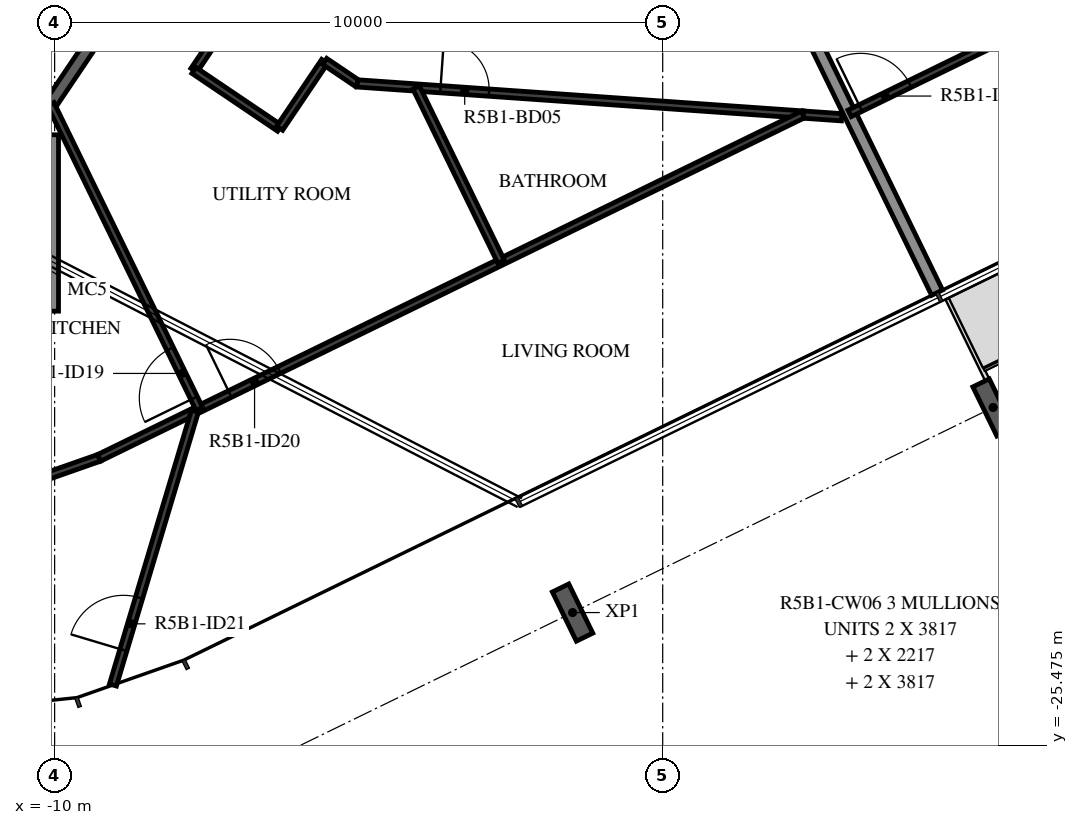
"""IFC4 building model, lengths in metres.
Left out: names, types, materials, properties, quantities, classifications, styles, units other than length and angle.
Written with IfcOpenShell. Run it as: python <this file> out.ifc"""

import sys

from ifc_helpers import new_model, si_unit, direction, frame, frame_2d, origin, origin_2d, place, context, subcontext, project, spatial, polyline, rectangle, i_section, outline, extrude, element, fill, save


model = new_model("IFC4")
c1 = context("Model", 3, precision=1e-05, world=origin(), true_north=direction((0.0, 1.0)))
c2 = subcontext(c1, "Body", "Model", "MODEL_VIEW")
j1 = project(units=[si_unit("LENGTHUNIT", "METRE"), si_unit("PLANEANGLEUNIT", "RADIAN")], contexts=[c1])
p1 = place(None, origin())
s1 = spatial("IfcSite", under=j1, at=p1, CompositionType="ELEMENT")
p2 = place(p1, origin())
s2 = spatial("IfcBuilding", under=s1, at=p2, CompositionType="ELEMENT")
p3 = place(p2, frame((0.0, 0.0, 198.9)))
s3 = spatial("IfcBuildingStorey", under=s2, at=p3, CompositionType="ELEMENT", Elevation=198.9)
for number, where, z_axis, x_axis in (
    (1, (-1.482, -23.287, -0.38), (0.0, 0.0, 1.0), (-0.899, -0.438, 0.0)),
    (2, (5.433, -19.915, -0.38), (0.0, 0.0, 1.0), (-0.899, -0.438, 0.0)),
):
    element("IfcColumn", number, at=place(p3, frame(where, z_axis=z_axis, x_axis=x_axis)), inside=s3, PredefinedType="COLUMN", context=c2, shape_type="SweptSolid", body=[
        extrude(i_section(OverallWidth=0.3, OverallDepth=0.9, WebThickness=0.019, FlangeThickness=0.035, FilletRadius=0.03, at=origin_2d()), origin(), (0.0, 0.0, 1.0), 3.5),
    ])
p4 = place(p3, frame((-10.066, -14.924, 0.0), z_axis=(0.0, 0.0, 1.0), x_axis=(0.559173899945, 0.829050390278, 0.0)))
e3 = element("IfcWall", 3, at=p4, inside=s3, PredefinedType="STANDARD", context=c2, shape_type="SweptSolid", body=[
    extrude(rectangle(XDim=4.601, YDim=0.2, at=frame_2d((2.301, 0.0))), origin(), (0.0, 0.0, 1.0), 3.12),
])
p5 = place(p3, frame((-10.408, -15.43, 0.0), z_axis=(0.0, 0.0, 1.0), x_axis=(0.559390561924, 0.828904215956, 0.0)))
e4 = element("IfcWall", 4, at=p5, inside=s3, PredefinedType="STANDARD", context=c2, shape_type="SweptSolid", body=[
    extrude(rectangle(XDim=0.612, YDim=0.2, at=frame_2d((0.306, 0.0))), origin(), (0.0, 0.0, 1.0), 3.12),
])
p6 = place(p3, frame((4.512, -18.027, 0.0), z_axis=(0.0, 0.0, 1.0), x_axis=(-0.438374835386, 0.898792247241, 0.0)))
e5 = element("IfcWall", 5, at=p6, inside=s3, PredefinedType="STANDARD", context=c2, shape_type="SweptSolid", body=[
    extrude(rectangle(XDim=4.929, YDim=0.2, at=frame_2d((2.464, 0.0))), origin(), (0.0, 0.0, 1.0), 2.73),
])
p7 = place(p3, frame((-6.968, -13.273, 0.0), z_axis=(0.0, 0.0, 1.0), x_axis=(-0.559283007371, -0.828976789582, 0.0)))
e6 = element("IfcWall", 6, at=p7, inside=s3, PredefinedType="PARTITIONING", context=c2, shape_type="SweptSolid", body=[
    extrude(rectangle(XDim=1.325, YDim=0.12, at=frame_2d((0.663, 0.0))), origin(), (0.0, 0.0, 1.0), 3.12),
])
p8 = place(p3, frame((-7.709, -14.371, 0.0), z_axis=(0.0, 0.0, 1.0), x_axis=(0.829033422808, -0.559199055675, 0.0)))
e7 = element("IfcWall", 7, at=p8, inside=s3, PredefinedType="PARTITIONING", context=c2, shape_type="SweptSolid", body=[
    extrude(rectangle(XDim=1.7, YDim=0.12, at=frame_2d((0.85, 0.0))), origin(), (0.0, 0.0, 1.0), 3.12),
])
p9 = place(p3, frame((-6.3, -15.322, 0.0), z_axis=(0.0, 0.0, 1.0), x_axis=(0.559197608403, 0.829034399019, 0.0)))
e8 = element("IfcWall", 8, at=p9, inside=s3, PredefinedType="PARTITIONING", context=c2, shape_type="SweptSolid", body=[
    extrude(rectangle(XDim=1.325, YDim=0.12, at=frame_2d((0.663, 0.0))), origin(), (0.0, 0.0, 1.0), 3.12),
])
p10 = place(p3, frame((-5.559, -14.223, 0.0), z_axis=(0.0, 0.0, 1.0), x_axis=(0.828844300469, -0.559479334363, 0.0)))
e9 = element("IfcWall", 9, at=p10, inside=s3, PredefinedType="PARTITIONING", context=c2, shape_type="SweptSolid", body=[
    extrude(rectangle(XDim=0.647, YDim=0.12, at=frame_2d((0.324, 0.0))), origin(), (0.0, 0.0, 1.0), 3.12),
])
p11 = place(p3, frame((-5.022, -14.585, 0.0), z_axis=(0.0, 0.0, 1.0), x_axis=(0.997564196041, -0.06975438895, 0.0)))
e10 = element("IfcWall", 10, at=p11, inside=s3, PredefinedType="PARTITIONING", context=c2, shape_type="SweptSolid", body=[
    extrude(rectangle(XDim=7.346, YDim=0.12, at=frame_2d((3.673, 0.0))), origin(), (0.0, 0.0, 1.0), 3.12),
])
p12 = place(p11, frame((1.37, 0.0, 0.0)))
e11 = element("IfcOpeningElement", 11, at=p12, cuts=e10, PredefinedType="OPENING", context=c2, shape_type="SweptSolid", body=[
    extrude(rectangle(XDim=0.8, YDim=2.1, at=frame_2d((0.4, 1.05))), frame((0.0, 0.07, 0.0), z_axis=(0.0, -1.0, 0.0), x_axis=(1.0, 0.0, 0.0)), (0.0, 0.0, 1.0), 0.14),
])
p13 = place(p3, frame((2.306, -15.098, 0.0), z_axis=(0.0, 0.0, 1.0), x_axis=(0.99757571817, -0.069589413839, 0.0)))
e12 = element("IfcWall", 12, at=p13, inside=s3, PredefinedType="PARTITIONING", context=c2, shape_type="SweptSolid", body=[
    extrude(rectangle(XDim=0.638, YDim=0.12, at=frame_2d((0.319, 0.0))), origin(), (0.0, 0.0, 1.0), 3.12),
])
p14 = place(p3, frame((-10.427, -21.149, 0.0), z_axis=(0.0, 0.0, 1.0), x_axis=(0.943591256744, 0.331112579338, 0.0)))
e13 = element("IfcWall", 13, at=p14, inside=s3, PredefinedType="PARTITIONING", context=c2, shape_type="SweptSolid", body=[
    extrude(rectangle(XDim=1.227, YDim=0.12, at=frame_2d((0.613, 0.0))), origin(), (0.0, 0.0, 1.0), 3.12),
])
p15 = place(p3, frame((-9.269, -20.743, 0.0), z_axis=(0.0, 0.0, 1.0), x_axis=(0.898796865831, 0.438365365846, 0.0)))
e14 = element("IfcWall", 14, at=p15, inside=s3, PredefinedType="PARTITIONING", context=c2, shape_type="SweptSolid", body=[
    extrude(rectangle(XDim=12.879, YDim=0.12, at=frame_2d((6.439, 0.0))), origin(), (0.0, 0.0, 1.0), 3.12),
])
p16 = place(p15, frame((2.395, 0.0, 0.0)))
e15 = element("IfcOpeningElement", 15, at=p16, cuts=e14, PredefinedType="OPENING", context=c2, shape_type="SweptSolid", body=[
    extrude(rectangle(XDim=0.9, YDim=2.1, at=frame_2d((0.45, 1.05))), frame((0.0, 0.07, 0.0), z_axis=(0.0, -1.0, 0.0), x_axis=(1.0, 0.0, 0.0)), (0.0, 0.0, 1.0), 0.14),
])
p17 = place(p3, frame((-7.62, -19.939, 0.0), z_axis=(0.0, 0.0, 1.0), x_axis=(-0.438353807908, 0.89880250283, 0.0)))
e16 = element("IfcWall", 16, at=p17, inside=s3, PredefinedType="PARTITIONING", context=c2, shape_type="SweptSolid", body=[
    extrude(rectangle(XDim=5.58, YDim=0.12, at=frame_2d((2.79, 0.0))), origin(), (0.0, 0.0, 1.0), 3.12),
])
p18 = place(p17, frame((0.2, 0.0, 0.0)))
e17 = element("IfcOpeningElement", 17, at=p18, cuts=e16, PredefinedType="OPENING", context=c2, shape_type="SweptSolid", body=[
    extrude(rectangle(XDim=0.9, YDim=2.1, at=frame_2d((0.45, 1.05))), frame((0.0, 0.07, 0.0), z_axis=(0.0, -1.0, 0.0), x_axis=(1.0, 0.0, 0.0)), (0.0, 0.0, 1.0), 0.14),
])
p19 = place(p3, frame((-9.041, -24.479, 0.0), z_axis=(0.0, 0.0, 1.0), x_axis=(0.286804727102, 0.957989064923, 0.0)))
e18 = element("IfcWall", 18, at=p19, inside=s3, PredefinedType="PARTITIONING", context=c2, shape_type="SweptSolid", body=[
    extrude(rectangle(XDim=4.701, YDim=0.12, at=frame_2d((2.351, 0.0))), origin(), (0.0, 0.0, 1.0), 3.12),
])
p20 = place(p19, frame((0.6, 0.0, 0.0)))
e19 = element("IfcOpeningElement", 19, at=p20, cuts=e18, PredefinedType="OPENING", context=c2, shape_type="SweptSolid", body=[
    extrude(rectangle(XDim=0.9, YDim=2.1, at=frame_2d((0.45, 1.05))), frame((0.0, 0.07, 0.0), z_axis=(0.0, -1.0, 0.0), x_axis=(1.0, 0.0, 0.0)), (0.0, 0.0, 1.0), 0.14),
])
p21 = place(p3, frame((-2.657, -17.518, 0.0), z_axis=(0.0, 0.0, 1.0), x_axis=(-0.438339139088, 0.898809656792, 0.0)))
e20 = element("IfcWall", 20, at=p21, inside=s3, PredefinedType="PARTITIONING", context=c2, shape_type="SweptSolid", body=[
    extrude(rectangle(XDim=3.188, YDim=0.12, at=frame_2d((1.594, 0.0))), origin(), (0.0, 0.0, 1.0), 3.12),
])
p22 = place(p3, frame((3.074, -15.078, 0.0), z_axis=(0.0, 0.0, 1.0), x_axis=(0.898793586225, 0.43837209008, 0.0)))
e21 = element("IfcWall", 21, at=p22, inside=s3, PredefinedType="PARTITIONING", context=c2, shape_type="SweptSolid", body=[
    extrude(rectangle(XDim=7.839, YDim=0.12, at=frame_2d((3.92, 0.0))), origin(), (0.0, 0.0, 1.0), 3.12),
])
p23 = place(p22, frame((0.2, 0.0, 0.0)))
e22 = element("IfcOpeningElement", 22, at=p23, cuts=e21, PredefinedType="OPENING", context=c2, shape_type="SweptSolid", body=[
    extrude(rectangle(XDim=0.9, YDim=2.1, at=frame_2d((0.45, 1.05))), frame((0.0, 0.07, 0.0), z_axis=(0.0, -1.0, 0.0), x_axis=(1.0, 0.0, 0.0)), (0.0, 0.0, 1.0), 0.14),
])
p24 = place(p3, origin())
e23 = element("IfcWall", 23, at=p24, inside=s3, PredefinedType="STANDARD", context=c2, shape_type="SweptSolid", body=[
    extrude(outline(polyline([(-9.936, -15.43), (-9.936, -18.331), (-12.836, -18.331), (-12.836, -15.43), (-9.936, -15.43)]), holes=[polyline([(-12.636, -18.131), (-10.136, -18.131), (-10.136, -15.631), (-12.636, -15.631), (-12.636, -18.131)])]), origin(), (0.0, 0.0, 1.0), 3.12),
])
p25 = place(p12, origin())
e24 = element("IfcDoor", 24, at=p25, inside=s3, OperationType="SINGLE_SWING_LEFT", PredefinedType="DOOR", context=c2, shape_type="SweptSolid", body=[
    extrude(rectangle(XDim=0.8, YDim=2.1, at=frame_2d((0.4, 1.05))), frame((0.0, 0.025, 0.0), z_axis=(0.0, -1.0, 0.0), x_axis=(1.0, 0.0, 0.0)), (0.0, 0.0, 1.0), 0.05),
])
fill(e11, e24)
p26 = place(p18, origin())
e25 = element("IfcDoor", 25, at=p26, inside=s3, OperationType="SINGLE_SWING_LEFT", PredefinedType="DOOR", context=c2, shape_type="SweptSolid", body=[
    extrude(rectangle(XDim=0.9, YDim=2.1, at=frame_2d((0.45, 1.05))), frame((0.0, 0.025, 0.0), z_axis=(0.0, -1.0, 0.0), x_axis=(1.0, 0.0, 0.0)), (0.0, 0.0, 1.0), 0.05),
])
fill(e17, e25)
p27 = place(p16, origin())
e26 = element("IfcDoor", 26, at=p27, inside=s3, OperationType="SINGLE_SWING_LEFT", PredefinedType="DOOR", context=c2, shape_type="SweptSolid", body=[
    extrude(rectangle(XDim=0.9, YDim=2.1, at=frame_2d((0.45, 1.05))), frame((0.0, 0.025, 0.0), z_axis=(0.0, -1.0, 0.0), x_axis=(1.0, 0.0, 0.0)), (0.0, 0.0, 1.0), 0.05),
])
fill(e15, e26)
p28 = place(p20, origin())
e27 = element("IfcDoor", 27, at=p28, inside=s3, OperationType="SINGLE_SWING_LEFT", PredefinedType="DOOR", context=c2, shape_type="SweptSolid", body=[
    extrude(rectangle(XDim=0.9, YDim=2.1, at=frame_2d((0.45, 1.05))), frame((0.0, 0.025, 0.0), z_axis=(0.0, -1.0, 0.0), x_axis=(1.0, 0.0, 0.0)), (0.0, 0.0, 1.0), 0.05),
])
fill(e19, e27)
p29 = place(p23, origin())
e28 = element("IfcDoor", 28, at=p29, inside=s3, OperationType="SINGLE_SWING_LEFT", PredefinedType="DOOR", context=c2, shape_type="SweptSolid", body=[
    extrude(rectangle(XDim=0.9, YDim=2.1, at=frame_2d((0.45, 1.05))), frame((0.0, 0.025, 0.0), z_axis=(0.0, -1.0, 0.0), x_axis=(1.0, 0.0, 0.0)), (0.0, 0.0, 1.0), 0.05),
])
fill(e22, e28)
save(model, sys.argv[1])
